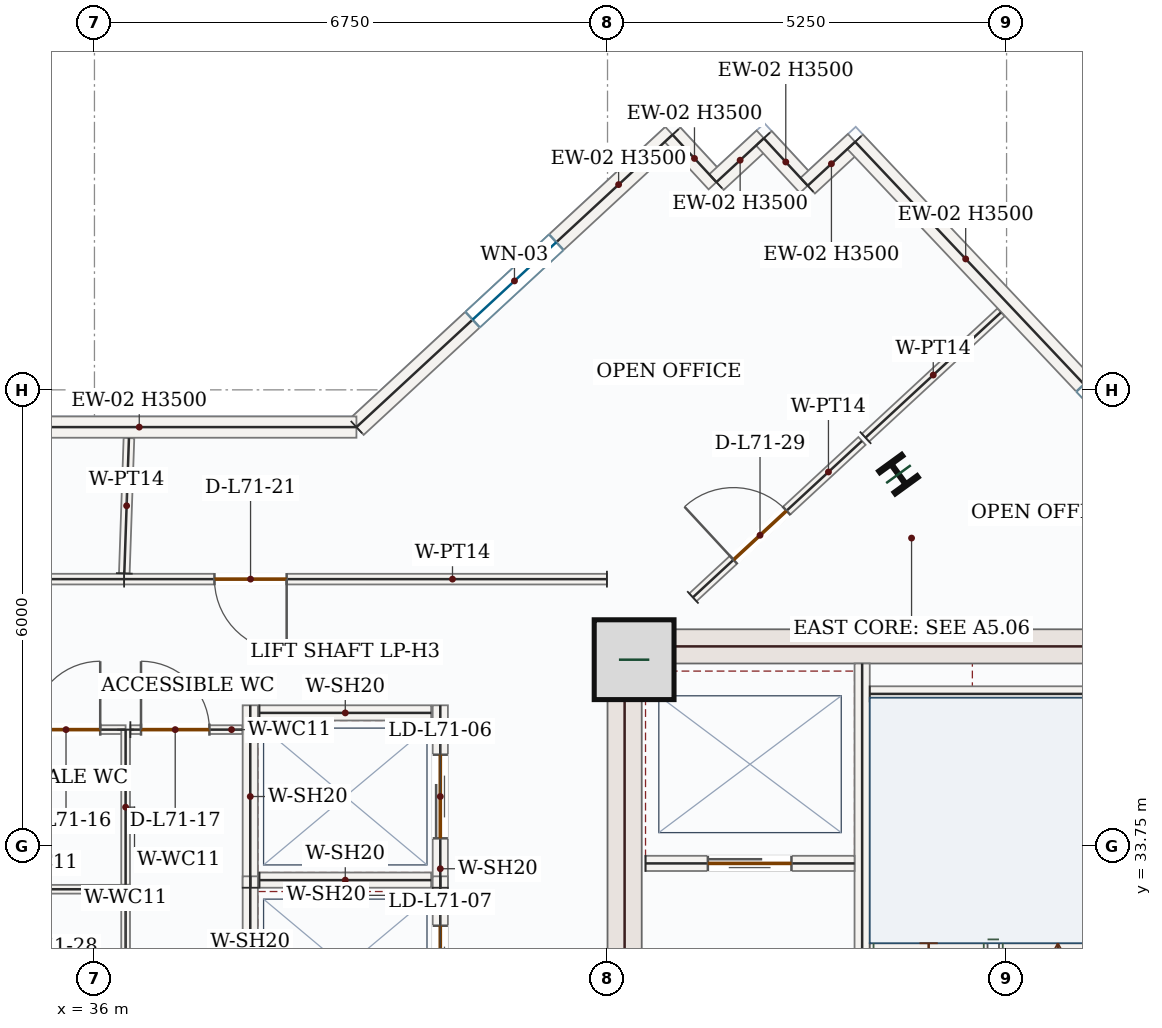
"""IFC4 building model, lengths in metres.
Left out: names, types, materials, properties, quantities, classifications, styles, units other than length and angle.
Written with IfcOpenShell. Run it as: python <this file> out.ifc"""

import sys

from ifc_helpers import new_model, si_unit, direction, frame, frame_2d, origin, origin_2d, place, context, subcontext, project, spatial, rectangle, i_section, extrude, source, transform, mapped, element, fill, save


model = new_model("IFC4")
c1 = context("Model", 3, precision=1e-05, world=origin(), true_north=direction((0.0, 1.0)))
c2 = subcontext(c1, "Body", "Model", "MODEL_VIEW")
j1 = project(units=[si_unit("LENGTHUNIT", "METRE"), si_unit("PLANEANGLEUNIT", "RADIAN")], contexts=[c1])
p1 = place(None, origin())
s1 = spatial("IfcSite", under=j1, at=p1, CompositionType="ELEMENT")
p2 = place(p1, origin())
s2 = spatial("IfcBuilding", under=s1, at=p2, CompositionType="ELEMENT")
p3 = place(p2, frame((0.0, 0.0, 295.35)))
s3 = spatial("IfcBuildingStorey", under=s2, at=p3, CompositionType="ELEMENT", Elevation=295.35)
p4 = place(p3, frame((42.975, 28.05, 0.0), z_axis=(0.0, 0.0, 1.0), x_axis=(0.0, 1.0, 0.0)))
e1 = element("IfcWall", 1, at=p4, inside=s3, PredefinedType="SHEAR", context=c2, shape_type="SweptSolid", body=[
    extrude(rectangle(XDim=8.55, YDim=0.45, at=frame_2d((4.275, 0.0))), origin(), (0.0, 0.0, 1.0), 3.5),
])
p5 = place(p4, frame((1.5, 0.0, 0.0)))
e2 = element("IfcOpeningElement", 2, at=p5, cuts=e1, PredefinedType="OPENING", context=c2, shape_type="SweptSolid", body=[
    extrude(rectangle(XDim=1.1, YDim=2.2, at=frame_2d((0.55, 1.1))), frame((0.0, 0.235, 0.0), z_axis=(0.0, -1.0, 0.0), x_axis=(1.0, 0.0, 0.0)), (0.0, 0.0, 1.0), 0.47),
])
m1 = source(origin(), c2, "Body", "SweptSolid", [
    extrude(rectangle(XDim=7.1, YDim=0.45, at=frame_2d((3.55, 0.0))), origin(), (0.0, 0.0, 1.0), 3.5),
])
p6 = place(p3, frame((43.2, 36.375, 0.0), z_axis=(0.0, 0.0, 1.0), x_axis=(1.0, 0.0, 0.0)))
e3 = element("IfcWall", 3, at=p6, inside=s3, PredefinedType="SHEAR", context=c2, shape_type="MappedRepresentation", body=[
    mapped(m1, transform((0.0, 0.0, 0.0), x_axis=(1.0, 0.0, 0.0), y_axis=(0.0, 1.0, 0.0), z_axis=(0.0, 0.0, 1.0), scale=1.0)),
])
m2 = source(origin(), c2, "Body", "SweptSolid", [
    extrude(rectangle(XDim=1.05, YDim=1.05, at=origin_2d()), origin(), (0.0, 0.0, 1.0), 3.75),
])
p7 = place(p3, frame((43.1, 36.2, 0.0), z_axis=(0.0, 0.0, 1.0), x_axis=(1.0, 0.0, 0.0)))
e4 = element("IfcColumn", 4, at=p7, inside=s3, PredefinedType="COLUMN", context=c2, shape_type="MappedRepresentation", body=[
    mapped(m2, transform((0.0, 0.0, 0.0), x_axis=(1.0, 0.0, 0.0), y_axis=(0.0, 1.0, 0.0), z_axis=(0.0, 0.0, 1.0), scale=1.0)),
])
m3 = source(origin(), c2, "Body", "SweptSolid", [
    extrude(i_section(OverallWidth=0.374, OverallDepth=0.372, WebThickness=0.016, FlangeThickness=0.026, FilletRadius=0.018, at=origin_2d()), origin(), (0.0, 0.0, 1.0), 3.75),
])
p8 = place(p3, frame((46.578, 38.641, 0.0), z_axis=(0.0, 0.0, 1.0), x_axis=(0.809016994375, 0.587785252292, 0.0)))
e5 = element("IfcColumn", 5, at=p8, inside=s3, PredefinedType="COLUMN", context=c2, shape_type="MappedRepresentation", body=[
    mapped(m3, transform((0.0, 0.0, 0.0), x_axis=(1.0, 0.0, 0.0), y_axis=(0.0, 1.0, 0.0), z_axis=(0.0, 0.0, 1.0), scale=1.0)),
])
p9 = place(p3, frame((39.447, 39.26, 0.0), z_axis=(0.0, 0.0, 1.0), x_axis=(0.734109106874, 0.679031530346, 0.0)))
e6 = element("IfcWall", 6, at=p9, inside=s3, PredefinedType="SOLIDWALL", context=c2, shape_type="SweptSolid", body=[
    extrude(rectangle(XDim=5.665, YDim=0.28, at=frame_2d((2.833, 0.0))), origin(), (0.0, 0.0, 1.0), 3.5),
])
p10 = place(p9, frame((2.082, 0.0, 0.85)))
e7 = element("IfcOpeningElement", 7, at=p10, cuts=e6, PredefinedType="OPENING", context=c2, shape_type="SweptSolid", body=[
    extrude(rectangle(XDim=1.5, YDim=1.5, at=frame_2d((0.75, 0.75))), frame((0.0, 0.15, 0.0), z_axis=(0.0, -1.0, 0.0), x_axis=(1.0, 0.0, 0.0)), (0.0, 0.0, 1.0), 0.3),
])
m4 = source(origin(), c2, "Body", "SweptSolid", [
    extrude(rectangle(XDim=0.85, YDim=0.28, at=frame_2d((0.425, 0.0))), origin(), (0.0, 0.0, 1.0), 3.5),
])
for number, where, z_axis, x_axis in (
    (8, (43.605, 43.107, 0.0), (0.0, 0.0, 1.0), (0.679, -0.734, 0.0)),
    (9, (44.183, 42.483, 0.0), (0.0, 0.0, 1.0), (0.734, 0.679, 0.0)),
    (10, (44.807, 43.06, 0.0), (0.0, 0.0, 1.0), (0.679, -0.734, 0.0)),
    (11, (45.384, 42.436, 0.0), (0.0, 0.0, 1.0), (0.734, 0.679, 0.0)),
):
    element("IfcWall", number, at=place(p3, frame(where, z_axis=z_axis, x_axis=x_axis)), inside=s3, PredefinedType="SOLIDWALL", context=c2, shape_type="MappedRepresentation", body=[
        mapped(m4, transform((0.0, 0.0, 0.0), x_axis=(1.0, 0.0, 0.0), y_axis=(0.0, 1.0, 0.0), z_axis=(0.0, 0.0, 1.0), scale=1.0)),
    ])
p11 = place(p3, frame((46.008, 43.013, 0.0), z_axis=(0.0, 0.0, 1.0), x_axis=(0.68643580465, -0.727190405667, 0.0)))
e12 = element("IfcWall", 12, at=p11, inside=s3, PredefinedType="SOLIDWALL", context=c2, shape_type="SweptSolid", body=[
    extrude(rectangle(XDim=10.274, YDim=0.28, at=frame_2d((5.137, 0.0))), origin(), (0.0, 0.0, 1.0), 3.5),
])
p12 = place(p11, frame((4.387, 0.0, 0.85)))
e13 = element("IfcOpeningElement", 13, at=p12, cuts=e12, PredefinedType="OPENING", context=c2, shape_type="SweptSolid", body=[
    extrude(rectangle(XDim=1.5, YDim=1.5, at=frame_2d((0.75, 0.75))), frame((0.0, 0.15, 0.0), z_axis=(0.0, -1.0, 0.0), x_axis=(1.0, 0.0, 0.0)), (0.0, 0.0, 1.0), 0.3),
])
m5 = source(origin(), c2, "Body", "SweptSolid", [
    extrude(rectangle(XDim=5.714, YDim=0.28, at=frame_2d((2.857, 0.0))), origin(), (0.0, 0.0, 1.0), 3.5),
])
p13 = place(p3, frame((33.732, 39.26, 0.0), z_axis=(0.0, 0.0, 1.0), x_axis=(1.0, 0.0, 0.0)))
e14 = element("IfcWall", 14, at=p13, inside=s3, PredefinedType="SOLIDWALL", context=c2, shape_type="MappedRepresentation", body=[
    mapped(m5, transform((0.0, 0.0, 0.0), x_axis=(1.0, 0.0, 0.0), y_axis=(0.0, 1.0, 0.0), z_axis=(0.0, 0.0, 1.0), scale=1.0)),
])
p14 = place(p3, frame((46.1, 28.15, 0.0), z_axis=(0.0, 0.0, 1.0), x_axis=(0.0, 1.0, 0.0)))
e15 = element("IfcWall", 15, at=p14, inside=s3, PredefinedType="SOLIDWALL", context=c2, shape_type="SweptSolid", body=[
    extrude(rectangle(XDim=8.0, YDim=0.2, at=frame_2d((4.0, 0.0))), origin(), (0.0, 0.0, 1.0), 3.5),
])
p15 = place(p14, frame((0.4, 0.0, 0.0)))
e16 = element("IfcOpeningElement", 16, at=p15, cuts=e15, PredefinedType="OPENING", context=c2, shape_type="SweptSolid", body=[
    extrude(rectangle(XDim=1.05, YDim=2.15, at=frame_2d((0.525, 1.075))), frame((0.0, 0.11, 0.0), z_axis=(0.0, -1.0, 0.0), x_axis=(1.0, 0.0, 0.0)), (0.0, 0.0, 1.0), 0.22),
])
m6 = source(origin(), c2, "Body", "SweptSolid", [
    extrude(rectangle(XDim=3.25, YDim=0.2, at=frame_2d((1.625, 0.0))), origin(), (0.0, 0.0, 1.0), 3.5),
])
p16 = place(p3, frame((46.2, 35.75, 0.0), z_axis=(0.0, 0.0, 1.0), x_axis=(1.0, 0.0, 0.0)))
e17 = element("IfcWall", 17, at=p16, inside=s3, PredefinedType="SOLIDWALL", context=c2, shape_type="MappedRepresentation", body=[
    mapped(m6, transform((0.0, 0.0, 0.0), x_axis=(1.0, 0.0, 0.0), y_axis=(0.0, 1.0, 0.0), z_axis=(0.0, 0.0, 1.0), scale=1.0)),
])
p17 = place(p3, frame((43.25, 33.52, 0.0), z_axis=(0.0, 0.0, 1.0), x_axis=(1.0, 0.0, 0.0)))
e18 = element("IfcWall", 18, at=p17, inside=s3, PredefinedType="SOLIDWALL", context=c2, shape_type="SweptSolid", body=[
    extrude(rectangle(XDim=2.75, YDim=0.2, at=frame_2d((1.375, 0.0))), origin(), (0.0, 0.0, 1.0), 3.5),
])
p18 = place(p17, frame((0.82, 0.0, 0.0)))
e19 = element("IfcOpeningElement", 19, at=p18, cuts=e18, PredefinedType="OPENING", context=c2, shape_type="SweptSolid", body=[
    extrude(rectangle(XDim=1.1, YDim=2.15, at=frame_2d((0.55, 1.075))), frame((0.0, 0.11, 0.0), z_axis=(0.0, -1.0, 0.0), x_axis=(1.0, 0.0, 0.0)), (0.0, 0.0, 1.0), 0.22),
])
m7 = source(origin(), c2, "Body", "SweptSolid", [
    extrude(rectangle(XDim=2.4, YDim=0.2, at=frame_2d((1.2, 0.0))), origin(), (0.0, 0.0, 1.0), 3.5),
])
p19 = place(p3, frame((38.05, 33.2, 0.0), z_axis=(0.0, 0.0, 1.0), x_axis=(0.0, 1.0, 0.0)))
e20 = element("IfcWall", 20, at=p19, inside=s3, PredefinedType="SOLIDWALL", context=c2, shape_type="MappedRepresentation", body=[
    mapped(m7, transform((0.0, 0.0, 0.0), x_axis=(1.0, 0.0, 0.0), y_axis=(0.0, 1.0, 0.0), z_axis=(0.0, 0.0, 1.0), scale=1.0)),
])
p20 = place(p3, frame((40.55, 33.2, 0.0), z_axis=(0.0, 0.0, 1.0), x_axis=(0.0, 1.0, 0.0)))
e21 = element("IfcWall", 21, at=p20, inside=s3, PredefinedType="SOLIDWALL", context=c2, shape_type="SweptSolid", body=[
    extrude(rectangle(XDim=2.4, YDim=0.2, at=frame_2d((1.2, 0.0))), origin(), (0.0, 0.0, 1.0), 3.5),
])
p21 = place(p20, frame((0.65, 0.0, 0.0)))
e22 = element("IfcOpeningElement", 22, at=p21, cuts=e21, PredefinedType="OPENING", context=c2, shape_type="SweptSolid", body=[
    extrude(rectangle(XDim=1.1, YDim=2.15, at=frame_2d((0.55, 1.075))), frame((0.0, 0.11, 0.0), z_axis=(0.0, -1.0, 0.0), x_axis=(1.0, 0.0, 0.0)), (0.0, 0.0, 1.0), 0.22),
])
m8 = source(origin(), c2, "Body", "SweptSolid", [
    extrude(rectangle(XDim=2.26, YDim=0.2, at=frame_2d((1.13, 0.0))), origin(), (0.0, 0.0, 1.0), 3.5),
])
for number, where, z_axis, x_axis in (
    (23, (38.17, 33.3, 0.0), (0.0, 0.0, 1.0), (1.0, 0.0, 0.0)),
    (24, (38.17, 35.5, 0.0), (0.0, 0.0, 1.0), (1.0, 0.0, 0.0)),
):
    element("IfcWall", number, at=place(p3, frame(where, z_axis=z_axis, x_axis=x_axis)), inside=s3, PredefinedType="SOLIDWALL", context=c2, shape_type="MappedRepresentation", body=[
        mapped(m8, transform((0.0, 0.0, 0.0), x_axis=(1.0, 0.0, 0.0), y_axis=(0.0, 1.0, 0.0), z_axis=(0.0, 0.0, 1.0), scale=1.0)),
    ])
p22 = place(p3, frame((38.05, 30.95, 0.0), z_axis=(0.0, 0.0, 1.0), x_axis=(0.0, 1.0, 0.0)))
e25 = element("IfcWall", 25, at=p22, inside=s3, PredefinedType="SOLIDWALL", context=c2, shape_type="MappedRepresentation", body=[
    mapped(m7, transform((0.0, 0.0, 0.0), x_axis=(1.0, 0.0, 0.0), y_axis=(0.0, 1.0, 0.0), z_axis=(0.0, 0.0, 1.0), scale=1.0)),
])
p23 = place(p3, frame((40.55, 30.95, 0.0), z_axis=(0.0, 0.0, 1.0), x_axis=(0.0, 1.0, 0.0)))
e26 = element("IfcWall", 26, at=p23, inside=s3, PredefinedType="SOLIDWALL", context=c2, shape_type="SweptSolid", body=[
    extrude(rectangle(XDim=2.4, YDim=0.2, at=frame_2d((1.2, 0.0))), origin(), (0.0, 0.0, 1.0), 3.5),
])
p24 = place(p23, frame((0.65, 0.0, 0.0)))
e27 = element("IfcOpeningElement", 27, at=p24, cuts=e26, PredefinedType="OPENING", context=c2, shape_type="SweptSolid", body=[
    extrude(rectangle(XDim=1.1, YDim=2.15, at=frame_2d((0.55, 1.075))), frame((0.0, 0.11, 0.0), z_axis=(0.0, -1.0, 0.0), x_axis=(1.0, 0.0, 0.0)), (0.0, 0.0, 1.0), 0.22),
])
m9 = source(origin(), c2, "Body", "SweptSolid", [
    extrude(rectangle(XDim=2.355, YDim=0.115, at=frame_2d((1.177, 0.0))), origin(), (0.0, 0.0, 1.0), 3.5),
])
p25 = place(p3, frame((34.055, 33.18, 0.0), z_axis=(0.0, 0.0, 1.0), x_axis=(1.0, 0.0, 0.0)))
e28 = element("IfcWall", 28, at=p25, inside=s3, PredefinedType="PARTITIONING", context=c2, shape_type="MappedRepresentation", body=[
    mapped(m9, transform((0.0, 0.0, 0.0), x_axis=(1.0, 0.0, 0.0), y_axis=(0.0, 1.0, 0.0), z_axis=(0.0, 0.0, 1.0), scale=1.0)),
])
m10 = source(origin(), c2, "Body", "SweptSolid", [
    extrude(rectangle(XDim=1.96, YDim=0.115, at=frame_2d((0.98, 0.0))), origin(), (0.0, 0.0, 1.0), 3.5),
])
p26 = place(p3, frame((36.41, 33.18, 0.0), z_axis=(0.0, 0.0, 1.0), x_axis=(0.0, -1.0, 0.0)))
e29 = element("IfcWall", 29, at=p26, inside=s3, PredefinedType="PARTITIONING", context=c2, shape_type="MappedRepresentation", body=[
    mapped(m10, transform((0.0, 0.0, 0.0), x_axis=(1.0, 0.0, 0.0), y_axis=(0.0, 1.0, 0.0), z_axis=(0.0, 0.0, 1.0), scale=1.0)),
])
p27 = place(p3, frame((34.055, 35.28, 0.0), z_axis=(0.0, 0.0, 1.0), x_axis=(1.0, 0.0, 0.0)))
e30 = element("IfcWall", 30, at=p27, inside=s3, PredefinedType="PARTITIONING", context=c2, shape_type="SweptSolid", body=[
    extrude(rectangle(XDim=2.355, YDim=0.115, at=frame_2d((1.177, 0.0))), origin(), (0.0, 0.0, 1.0), 3.5),
])
p28 = place(p27, frame((1.121, 0.0, 0.0)))
e31 = element("IfcOpeningElement", 31, at=p28, cuts=e30, PredefinedType="OPENING", context=c2, shape_type="SweptSolid", body=[
    extrude(rectangle(XDim=0.9, YDim=2.1, at=frame_2d((0.45, 1.05))), frame((0.0, 0.067, 0.0), z_axis=(0.0, -1.0, 0.0), x_axis=(1.0, 0.0, 0.0)), (0.0, 0.0, 1.0), 0.135),
])
m11 = source(origin(), c2, "Body", "SweptSolid", [
    extrude(rectangle(XDim=2.04, YDim=0.115, at=frame_2d((1.02, 0.0))), origin(), (0.0, 0.0, 1.0), 3.5),
])
p29 = place(p3, frame((36.41, 35.28, 0.0), z_axis=(0.0, 0.0, 1.0), x_axis=(0.0, -1.0, 0.0)))
e32 = element("IfcWall", 32, at=p29, inside=s3, PredefinedType="PARTITIONING", context=c2, shape_type="MappedRepresentation", body=[
    mapped(m11, transform((0.0, 0.0, 0.0), x_axis=(1.0, 0.0, 0.0), y_axis=(0.0, 1.0, 0.0), z_axis=(0.0, 0.0, 1.0), scale=1.0)),
])
p30 = place(p3, frame((36.472, 35.28, 0.0), z_axis=(0.0, 0.0, 1.0), x_axis=(1.0, 0.0, 0.0)))
e33 = element("IfcWall", 33, at=p30, inside=s3, PredefinedType="PARTITIONING", context=c2, shape_type="SweptSolid", body=[
    extrude(rectangle(XDim=1.473, YDim=0.115, at=frame_2d((0.736, 0.0))), origin(), (0.0, 0.0, 1.0), 3.5),
])
p31 = place(p30, frame((0.14, 0.0, 0.0)))
e34 = element("IfcOpeningElement", 34, at=p31, cuts=e33, PredefinedType="OPENING", context=c2, shape_type="SweptSolid", body=[
    extrude(rectangle(XDim=0.9, YDim=2.1, at=frame_2d((0.45, 1.05))), frame((0.0, 0.067, 0.0), z_axis=(0.0, -1.0, 0.0), x_axis=(1.0, 0.0, 0.0)), (0.0, 0.0, 1.0), 0.135),
])
p32 = place(p3, frame((43.873, 37.02, 0.0), z_axis=(0.0, 0.0, 1.0), x_axis=(0.734120521476, 0.679019189676, 0.0)))
e35 = element("IfcWall", 35, at=p32, inside=s3, PredefinedType="PARTITIONING", context=c2, shape_type="SweptSolid", body=[
    extrude(rectangle(XDim=3.031, YDim=0.14, at=frame_2d((1.515, 0.0))), origin(), (0.0, 0.0, 1.0), 3.5),
])
p33 = place(p32, frame((0.728, 0.0, 0.0)))
e36 = element("IfcOpeningElement", 36, at=p33, cuts=e35, PredefinedType="OPENING", context=c2, shape_type="SweptSolid", body=[
    extrude(rectangle(XDim=0.95, YDim=2.15, at=frame_2d((0.475, 1.075))), frame((0.0, 0.08, 0.0), z_axis=(0.0, -1.0, 0.0), x_axis=(1.0, 0.0, 0.0)), (0.0, 0.0, 1.0), 0.16),
])
m12 = source(origin(), c2, "Body", "SweptSolid", [
    extrude(rectangle(XDim=2.428, YDim=0.14, at=frame_2d((1.214, 0.0))), origin(), (0.0, 0.0, 1.0), 3.5),
])
p34 = place(p3, frame((46.144, 39.121, 0.0), z_axis=(0.0, 0.0, 1.0), x_axis=(0.734124504125, 0.679014883815, 0.0)))
e37 = element("IfcWall", 37, at=p34, inside=s3, PredefinedType="PARTITIONING", context=c2, shape_type="MappedRepresentation", body=[
    mapped(m12, transform((0.0, 0.0, 0.0), x_axis=(1.0, 0.0, 0.0), y_axis=(0.0, 1.0, 0.0), z_axis=(0.0, 0.0, 1.0), scale=1.0)),
])
p35 = place(p3, frame((42.742, 37.26, 0.0), z_axis=(0.0, 0.0, 1.0), x_axis=(-0.999999999261, 3.8433452e-05, 0.0)))
e38 = element("IfcWall", 38, at=p35, inside=s3, PredefinedType="PARTITIONING", context=c2, shape_type="SweptSolid", body=[
    extrude(rectangle(XDim=6.352, YDim=0.14, at=frame_2d((3.176, 0.0))), origin(), (0.0, 0.0, 1.0), 3.5),
])
p36 = place(p35, frame((4.214, 0.0, 0.0)))
e39 = element("IfcOpeningElement", 39, at=p36, cuts=e38, PredefinedType="OPENING", context=c2, shape_type="SweptSolid", body=[
    extrude(rectangle(XDim=0.95, YDim=2.15, at=frame_2d((0.475, 1.075))), frame((0.0, 0.08, 0.0), z_axis=(0.0, -1.0, 0.0), x_axis=(1.0, 0.0, 0.0)), (0.0, 0.0, 1.0), 0.16),
])
m13 = source(origin(), c2, "Body", "SweptSolid", [
    extrude(rectangle(XDim=1.781, YDim=0.14, at=frame_2d((0.891, 0.0))), origin(), (0.0, 0.0, 1.0), 3.5),
])
p37 = place(p3, frame((36.393, 37.335, 0.0), z_axis=(0.0, 0.0, 1.0), x_axis=(0.034268709891, 0.999412655274, 0.0)))
e40 = element("IfcWall", 40, at=p37, inside=s3, PredefinedType="PARTITIONING", context=c2, shape_type="MappedRepresentation", body=[
    mapped(m13, transform((0.0, 0.0, 0.0), x_axis=(1.0, 0.0, 0.0), y_axis=(0.0, 1.0, 0.0), z_axis=(0.0, 0.0, 1.0), scale=1.0)),
])
p38 = place(p3, frame((36.39, 37.26, 0.0), z_axis=(0.0, 0.0, 1.0), x_axis=(-0.999999997659, -6.8420512e-05, 0.0)))
e41 = element("IfcWall", 41, at=p38, inside=s3, PredefinedType="PARTITIONING", context=c2, shape_type="SweptSolid", body=[
    extrude(rectangle(XDim=7.136, YDim=0.14, at=frame_2d((3.568, 0.0))), origin(), (0.0, 0.0, 1.0), 3.5),
])
p39 = place(p38, frame((1.361, 0.0, 0.0)))
e42 = element("IfcOpeningElement", 42, at=p39, cuts=e41, PredefinedType="OPENING", context=c2, shape_type="SweptSolid", body=[
    extrude(rectangle(XDim=0.95, YDim=2.15, at=frame_2d((0.475, 1.075))), frame((0.0, 0.08, 0.0), z_axis=(0.0, -1.0, 0.0), x_axis=(1.0, 0.0, 0.0)), (0.0, 0.0, 1.0), 0.16),
])
m14 = source(origin(), c2, "Body", "SweptSolid", [
    extrude(rectangle(XDim=1.5, YDim=1.5, at=frame_2d((0.75, 0.75))), frame((0.0, 0.03, 0.0), z_axis=(0.0, -1.0, 0.0), x_axis=(1.0, 0.0, 0.0)), (0.0, 0.0, 1.0), 0.06),
])
p40 = place(p10, origin())
e43 = element("IfcWindow", 43, at=p40, inside=s3, PartitioningType="SINGLE_PANEL", PredefinedType="WINDOW", context=c2, shape_type="MappedRepresentation", body=[
    mapped(m14, transform((0.0, 0.0, 0.0), x_axis=(1.0, 0.0, 0.0), y_axis=(0.0, 1.0, 0.0), z_axis=(0.0, 0.0, 1.0), scale=1.0)),
])
fill(e7, e43)
p41 = place(p12, origin())
e44 = element("IfcWindow", 44, at=p41, inside=s3, PartitioningType="SINGLE_PANEL", PredefinedType="WINDOW", context=c2, shape_type="MappedRepresentation", body=[
    mapped(m14, transform((0.0, 0.0, 0.0), x_axis=(1.0, 0.0, 0.0), y_axis=(0.0, 1.0, 0.0), z_axis=(0.0, 0.0, 1.0), scale=1.0)),
])
fill(e13, e44)
m15 = source(origin(), c2, "Body", "SweptSolid", [
    extrude(rectangle(XDim=1.1, YDim=2.15, at=frame_2d((0.55, 1.075))), frame((0.0, 0.025, 0.0), z_axis=(0.0, -1.0, 0.0), x_axis=(1.0, 0.0, 0.0)), (0.0, 0.0, 1.0), 0.05),
])
p42 = place(p18, origin())
e45 = element("IfcDoor", 45, at=p42, inside=s3, OperationType="DOUBLE_DOOR_SLIDING", PredefinedType="DOOR", context=c2, shape_type="MappedRepresentation", body=[
    mapped(m15, transform((0.0, 0.0, 0.0), x_axis=(1.0, 0.0, 0.0), y_axis=(0.0, 1.0, 0.0), z_axis=(0.0, 0.0, 1.0), scale=1.0)),
])
fill(e19, e45)
p43 = place(p21, origin())
e46 = element("IfcDoor", 46, at=p43, inside=s3, OperationType="DOUBLE_DOOR_SLIDING", PredefinedType="DOOR", context=c2, shape_type="MappedRepresentation", body=[
    mapped(m15, transform((0.0, 0.0, 0.0), x_axis=(1.0, 0.0, 0.0), y_axis=(0.0, 1.0, 0.0), z_axis=(0.0, 0.0, 1.0), scale=1.0)),
])
fill(e22, e46)
p44 = place(p24, origin())
e47 = element("IfcDoor", 47, at=p44, inside=s3, OperationType="DOUBLE_DOOR_SLIDING", PredefinedType="DOOR", context=c2, shape_type="MappedRepresentation", body=[
    mapped(m15, transform((0.0, 0.0, 0.0), x_axis=(1.0, 0.0, 0.0), y_axis=(0.0, 1.0, 0.0), z_axis=(0.0, 0.0, 1.0), scale=1.0)),
])
fill(e27, e47)
m16 = source(origin(), c2, "Body", "SweptSolid", [
    extrude(rectangle(XDim=0.9, YDim=2.1, at=frame_2d((0.45, 1.05))), frame((0.0, 0.025, 0.0), z_axis=(0.0, -1.0, 0.0), x_axis=(1.0, 0.0, 0.0)), (0.0, 0.0, 1.0), 0.05),
])
p45 = place(p28, origin())
e48 = element("IfcDoor", 48, at=p45, inside=s3, OperationType="SINGLE_SWING_RIGHT", PredefinedType="DOOR", context=c2, shape_type="MappedRepresentation", body=[
    mapped(m16, transform((0.0, 0.0, 0.0), x_axis=(1.0, 0.0, 0.0), y_axis=(0.0, 1.0, 0.0), z_axis=(0.0, 0.0, 1.0), scale=1.0)),
])
fill(e31, e48)
p46 = place(p31, origin())
e49 = element("IfcDoor", 49, at=p46, inside=s3, OperationType="SINGLE_SWING_LEFT", PredefinedType="DOOR", context=c2, shape_type="MappedRepresentation", body=[
    mapped(m16, transform((0.0, 0.0, 0.0), x_axis=(1.0, 0.0, 0.0), y_axis=(0.0, 1.0, 0.0), z_axis=(0.0, 0.0, 1.0), scale=1.0)),
])
fill(e34, e49)
m17 = source(origin(), c2, "Body", "SweptSolid", [
    extrude(rectangle(XDim=0.95, YDim=2.15, at=frame_2d((0.475, 1.075))), frame((0.0, 0.025, 0.0), z_axis=(0.0, -1.0, 0.0), x_axis=(1.0, 0.0, 0.0)), (0.0, 0.0, 1.0), 0.05),
])
p47 = place(p36, origin())
e50 = element("IfcDoor", 50, at=p47, inside=s3, OperationType="SINGLE_SWING_LEFT", PredefinedType="DOOR", context=c2, shape_type="MappedRepresentation", body=[
    mapped(m17, transform((0.0, 0.0, 0.0), x_axis=(1.0, 0.0, 0.0), y_axis=(0.0, 1.0, 0.0), z_axis=(0.0, 0.0, 1.0), scale=1.0)),
])
fill(e39, e50)
p48 = place(p33, origin())
e51 = element("IfcDoor", 51, at=p48, inside=s3, OperationType="SINGLE_SWING_LEFT", PredefinedType="DOOR", context=c2, shape_type="MappedRepresentation", body=[
    mapped(m17, transform((0.0, 0.0, 0.0), x_axis=(1.0, 0.0, 0.0), y_axis=(0.0, 1.0, 0.0), z_axis=(0.0, 0.0, 1.0), scale=1.0)),
])
fill(e36, e51)
save(model, sys.argv[1])
